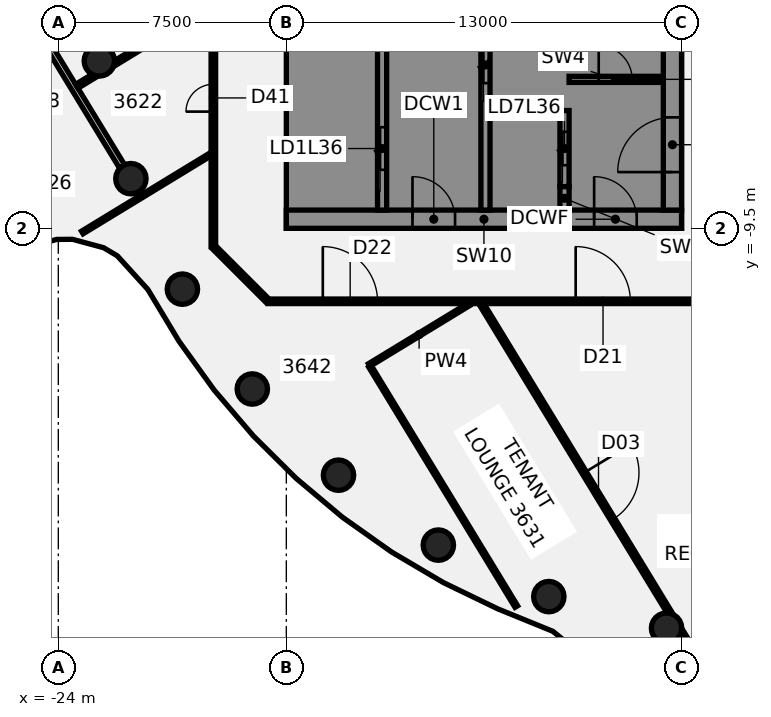
"""IFC4 building model, lengths in metres.
Left out: names, types, materials, properties, quantities, classifications, styles, units other than length and angle.
Written with IfcOpenShell. Run it as: python <this file> out.ifc"""

import sys

from ifc_helpers import new_model, si_unit, direction, frame, frame_2d, origin, origin_2d, place, context, subcontext, project, spatial, polyline, rectangle, circle, outline, extrude, element, fill, save


model = new_model("IFC4")
c1 = context("Model", 3, precision=1e-05, world=origin(), true_north=direction((0.0, 1.0)))
c2 = subcontext(c1, "Body", "Model", "MODEL_VIEW")
j1 = project(units=[si_unit("LENGTHUNIT", "METRE"), si_unit("PLANEANGLEUNIT", "RADIAN")], contexts=[c1])
p1 = place(None, origin())
s1 = spatial("IfcSite", under=j1, at=p1, CompositionType="ELEMENT")
p2 = place(p1, origin())
s2 = spatial("IfcBuilding", under=s1, at=p2, CompositionType="ELEMENT")
p3 = place(p2, frame((0.0, 0.0, 148.0)))
s3 = spatial("IfcBuildingStorey", under=s2, at=p3, CompositionType="ELEMENT", Elevation=148.0)
for number, where, z_axis, x_axis in (
    (1, (-22.651, -3.994, -0.14), (0.0, 0.0, 1.0), (1.0, 0.0, 0.0)),
    (2, (-21.613, -7.866, -0.14), (0.0, 0.0, 1.0), (1.0, 0.0, 0.0)),
    (3, (-19.919, -11.5, -0.14), (0.0, 0.0, 1.0), (1.0, 0.0, 0.0)),
    (4, (-17.619, -14.784, -0.14), (0.0, 0.0, 1.0), (1.0, 0.0, 0.0)),
    (5, (-14.784, -17.619, -0.14), (0.0, 0.0, 1.0), (1.0, 0.0, 0.0)),
    (6, (-11.5, -19.919, -0.14), (0.0, 0.0, 1.0), (1.0, 0.0, 0.0)),
    (7, (-7.866, -21.613, -0.14), (0.0, 0.0, 1.0), (1.0, 0.0, 0.0)),
    (8, (-3.994, -22.651, -0.14), (0.0, 0.0, 1.0), (1.0, 0.0, 0.0)),
):
    element("IfcColumn", number, at=place(p3, frame(where, z_axis=z_axis, x_axis=x_axis)), inside=s3, PredefinedType="COLUMN", context=c2, shape_type="SweptSolid", body=[
        extrude(circle(Radius=0.5, at=origin_2d()), origin(), (0.0, 0.0, 1.0), 3.75),
    ])
p4 = place(p3, frame((-28.73, 3.745, 0.0), z_axis=(0.0, 0.0, 1.0), x_axis=(0.520124017565, -0.854090748312, 0.0)))
e9 = element("IfcWall", 9, at=p4, inside=s3, PredefinedType="PARTITIONING", context=c2, shape_type="SweptSolid", body=[
    extrude(rectangle(XDim=13.121, YDim=0.2, at=frame_2d((6.561, 0.0))), origin(), (0.0, 0.0, 1.0), 3.01),
])
p5 = place(p4, frame((5.799, 0.0, 0.0)))
e10 = element("IfcOpeningElement", 10, at=p5, cuts=e9, PredefinedType="OPENING", context=c2, shape_type="SweptSolid", body=[
    extrude(rectangle(XDim=1.4, YDim=2.1, at=frame_2d((0.7, 1.05))), frame((0.0, 0.11, 0.0), z_axis=(0.0, -1.0, 0.0), x_axis=(1.0, 0.0, 0.0)), (0.0, 0.0, 1.0), 0.22),
])
p6 = place(p3, frame((-13.747, -14.039, 0.0), z_axis=(0.0, 0.0, 1.0), x_axis=(0.520158758084, -0.854069591069, 0.0)))
e11 = element("IfcWall", 11, at=p6, inside=s3, PredefinedType="PARTITIONING", context=c2, shape_type="SweptSolid", body=[
    extrude(rectangle(XDim=9.25, YDim=0.1, at=frame_2d((4.625, 0.0))), origin(), (0.0, 0.0, 1.0), 3.01),
])
p7 = place(p3, frame((-10.073, -11.998, 0.0), z_axis=(0.0, 0.0, 1.0), x_axis=(0.520207638853, -0.854039819024, 0.0)))
e12 = element("IfcWall", 12, at=p7, inside=s3, PredefinedType="PARTITIONING", context=c2, shape_type="SweptSolid", body=[
    extrude(rectangle(XDim=11.913, YDim=0.15, at=frame_2d((5.956, 0.0))), origin(), (0.0, 0.0, 1.0), 3.01),
])
p8 = place(p7, frame((6.485, 0.0, 0.0)))
e13 = element("IfcOpeningElement", 13, at=p8, cuts=e12, PredefinedType="OPENING", context=c2, shape_type="SweptSolid", body=[
    extrude(rectangle(XDim=1.8, YDim=2.1, at=frame_2d((0.9, 1.05))), frame((0.0, 0.085, 0.0), z_axis=(0.0, -1.0, 0.0), x_axis=(1.0, 0.0, 0.0)), (0.0, 0.0, 1.0), 0.17),
])
p9 = place(p3, frame((-3.515, -22.766, 0.0), z_axis=(0.0, 0.0, 1.0), x_axis=(0.520185263298, -0.854053447887, 0.0)))
e14 = element("IfcWall", 14, at=p9, inside=s3, PredefinedType="PARTITIONING", context=c2, shape_type="SweptSolid", body=[
    extrude(rectangle(XDim=4.875, YDim=0.15, at=frame_2d((2.437, 0.0))), origin(), (0.0, 0.0, 1.0), 3.01),
])
p10 = place(p3, frame((-18.872, -10.128, 0.0), z_axis=(0.0, 0.0, 1.0), x_axis=(0.707106781187, -0.707106781187, 0.0)))
e15 = element("IfcWall", 15, at=p10, inside=s3, PredefinedType="PARTITIONING", context=c2, shape_type="SweptSolid", body=[
    extrude(rectangle(XDim=2.465, YDim=0.15, at=frame_2d((1.232, 0.0))), origin(), (0.0, 0.0, 1.0), 3.01),
])
p11 = place(p3, frame((-17.1, -11.9, 0.0), z_axis=(0.0, 0.0, 1.0), x_axis=(1.0, 0.0, 0.0)))
e16 = element("IfcWall", 16, at=p11, inside=s3, PredefinedType="PARTITIONING", context=c2, shape_type="SweptSolid", body=[
    extrude(rectangle(XDim=34.165, YDim=0.15, at=frame_2d((17.083, 0.0))), origin(), (0.0, 0.0, 1.0), 3.01),
])
p12 = place(p11, frame((10.117, 0.0, 0.0)))
e17 = element("IfcOpeningElement", 17, at=p12, cuts=e16, PredefinedType="OPENING", context=c2, shape_type="SweptSolid", body=[
    extrude(rectangle(XDim=1.8, YDim=2.1, at=frame_2d((0.9, 1.05))), frame((0.0, 0.085, 0.0), z_axis=(0.0, -1.0, 0.0), x_axis=(1.0, 0.0, 0.0)), (0.0, 0.0, 1.0), 0.17),
])
p13 = place(p11, frame((1.8, 0.0, 0.0)))
e18 = element("IfcOpeningElement", 18, at=p13, cuts=e16, PredefinedType="OPENING", context=c2, shape_type="SweptSolid", body=[
    extrude(rectangle(XDim=1.8, YDim=2.1, at=frame_2d((0.9, 1.05))), frame((0.0, 0.085, 0.0), z_axis=(0.0, -1.0, 0.0), x_axis=(1.0, 0.0, 0.0)), (0.0, 0.0, 1.0), 0.17),
])
p14 = place(p11, frame((25.997, 0.0, 0.0)))
e19 = element("IfcOpeningElement", 19, at=p14, cuts=e16, PredefinedType="OPENING", context=c2, shape_type="SweptSolid", body=[
    extrude(rectangle(XDim=1.8, YDim=2.1, at=frame_2d((0.9, 1.05))), frame((0.0, 0.085, 0.0), z_axis=(0.0, -1.0, 0.0), x_axis=(1.0, 0.0, 0.0)), (0.0, 0.0, 1.0), 0.17),
])
p15 = place(p3, frame((-23.392, -4.828, 0.0), z_axis=(0.0, 0.0, 1.0), x_axis=(0.854171525625, 0.519991350708, 0.0)))
e20 = element("IfcWall", 20, at=p15, inside=s3, PredefinedType="PARTITIONING", context=c2, shape_type="SweptSolid", body=[
    extrude(rectangle(XDim=0.698, YDim=0.15, at=frame_2d((0.349, 0.0))), origin(), (0.0, 0.0, 1.0), 3.01),
])
p16 = place(p3, frame((-22.164, -4.08, 0.0), z_axis=(0.0, 0.0, 1.0), x_axis=(0.854120951194, 0.520074418454, 0.0)))
e21 = element("IfcWall", 21, at=p16, inside=s3, PredefinedType="PARTITIONING", context=c2, shape_type="SweptSolid", body=[
    extrude(rectangle(XDim=3.706, YDim=0.15, at=frame_2d((1.853, 0.0))), origin(), (0.0, 0.0, 1.0), 3.01),
])
p17 = place(p3, frame((-23.211, -9.636, 0.0), z_axis=(0.0, 0.0, 1.0), x_axis=(0.854072881225, 0.520153355806, 0.0)))
e22 = element("IfcWall", 22, at=p17, inside=s3, PredefinedType="PARTITIONING", context=c2, shape_type="SweptSolid", body=[
    extrude(rectangle(XDim=4.953, YDim=0.1, at=frame_2d((2.476, 0.0))), origin(), (0.0, 0.0, 1.0), 3.01),
])
p18 = place(p3, frame((-13.773, -13.996, 0.0), z_axis=(0.0, 0.0, 1.0), x_axis=(0.85407452776, 0.520150652245, 0.0)))
e23 = element("IfcWall", 23, at=p18, inside=s3, PredefinedType="PARTITIONING", context=c2, shape_type="SweptSolid", body=[
    extrude(rectangle(XDim=3.84, YDim=0.1, at=frame_2d((1.92, 0.0))), origin(), (0.0, 0.0, 1.0), 3.01),
])
p19 = place(p3, frame((-3.745, -28.73, 0.0), z_axis=(0.0, 0.0, 1.0), x_axis=(0.854090748312, 0.520124017565, 0.0)))
e24 = element("IfcWall", 24, at=p19, inside=s3, PredefinedType="PARTITIONING", context=c2, shape_type="SweptSolid", body=[
    extrude(rectangle(XDim=13.121, YDim=0.2, at=frame_2d((6.561, 0.0))), origin(), (0.0, 0.0, 1.0), 3.01),
])
p20 = place(p19, frame((6.099, 0.0, 0.0)))
e25 = element("IfcOpeningElement", 25, at=p20, cuts=e24, PredefinedType="OPENING", context=c2, shape_type="SweptSolid", body=[
    extrude(rectangle(XDim=1.4, YDim=2.1, at=frame_2d((0.7, 1.05))), frame((0.0, 0.11, 0.0), z_axis=(0.0, -1.0, 0.0), x_axis=(1.0, 0.0, 0.0)), (0.0, 0.0, 1.0), 0.22),
])
p21 = place(p3, frame((-18.9, -10.1, 0.0), z_axis=(0.0, 0.0, 1.0), x_axis=(0.0, 1.0, 0.0)))
e26 = element("IfcWall", 26, at=p21, inside=s3, PredefinedType="PARTITIONING", context=c2, shape_type="SweptSolid", body=[
    extrude(rectangle(XDim=20.2, YDim=0.15, at=frame_2d((10.1, 0.0))), origin(), (0.0, 0.0, 1.0), 3.01),
])
p22 = place(p21, frame((12.057, 0.0, 0.0)))
e27 = element("IfcOpeningElement", 27, at=p22, cuts=e26, PredefinedType="OPENING", context=c2, shape_type="SweptSolid", body=[
    extrude(rectangle(XDim=1.8, YDim=2.1, at=frame_2d((0.9, 1.05))), frame((0.0, 0.085, 0.0), z_axis=(0.0, -1.0, 0.0), x_axis=(1.0, 0.0, 0.0)), (0.0, 0.0, 1.0), 0.17),
])
p23 = place(p21, frame((4.439, 0.0, 0.0)))
e28 = element("IfcOpeningElement", 28, at=p23, cuts=e26, PredefinedType="OPENING", context=c2, shape_type="SweptSolid", body=[
    extrude(rectangle(XDim=0.9, YDim=2.1, at=frame_2d((0.45, 1.05))), frame((0.0, 0.085, 0.0), z_axis=(0.0, -1.0, 0.0), x_axis=(1.0, 0.0, 0.0)), (0.0, 0.0, 1.0), 0.17),
])
p24 = place(p3, frame((-16.5, -9.2, 0.0), z_axis=(0.0, 0.0, 1.0), x_axis=(1.0, 0.0, 0.0)))
e29 = element("IfcWall", 29, at=p24, inside=s3, PredefinedType="SHEAR", context=c2, shape_type="SweptSolid", body=[
    extrude(rectangle(XDim=13.0, YDim=0.6, at=frame_2d((6.5, 0.0))), origin(), (0.0, 0.0, 1.0), 3.61),
])
p25 = place(p24, frame((4.15, 0.0, 0.0)))
e30 = element("IfcOpeningElement", 30, at=p25, cuts=e29, PredefinedType="OPENING", context=c2, shape_type="SweptSolid", body=[
    extrude(rectangle(XDim=1.4, YDim=2.1, at=frame_2d((0.7, 1.05))), frame((0.0, 0.31, 0.0), z_axis=(0.0, -1.0, 0.0), x_axis=(1.0, 0.0, 0.0)), (0.0, 0.0, 1.0), 0.62),
])
p26 = place(p24, frame((10.125, 0.0, 0.0)))
e31 = element("IfcOpeningElement", 31, at=p26, cuts=e29, PredefinedType="OPENING", context=c2, shape_type="SweptSolid", body=[
    extrude(rectangle(XDim=1.4, YDim=2.1, at=frame_2d((0.7, 1.05))), frame((0.0, 0.31, 0.0), z_axis=(0.0, -1.0, 0.0), x_axis=(1.0, 0.0, 0.0)), (0.0, 0.0, 1.0), 0.62),
])
p27 = place(p3, origin())
e32 = element("IfcWall", 32, at=p27, inside=s3, PredefinedType="SHEAR", context=c2, shape_type="SweptSolid", body=[
    extrude(outline(polyline([(-13.5, -8.125), (-15.9, -8.125), (-15.9, -5.625), (-13.5, -5.625), (-13.5, -5.375), (-15.9, -5.375), (-15.9, 5.375), (-13.5, 5.375), (-13.5, 5.625), (-15.9, 5.625), (-15.9, 8.125), (-13.5, 8.125), (-13.5, 8.9), (-15.9, 8.9), (-16.5, 8.9), (-16.5, -8.9), (-15.9, -8.9), (-13.5, -8.9), (-13.5, -8.125)])), origin(), (0.0, 0.0, 1.0), 3.61),
])
p28 = place(p3, origin())
e33 = element("IfcWall", 33, at=p28, inside=s3, PredefinedType="SHEAR", context=c2, shape_type="SweptSolid", body=[
    extrude(outline(polyline([(-9.8, -5.375), (-9.8, -5.625), (-7.5, -5.625), (-7.2, -5.625), (-7.2, 8.9), (-7.5, 8.9), (-9.8, 8.9), (-9.8, 8.125), (-7.5, 8.125), (-7.5, 5.625), (-9.8, 5.625), (-9.8, 5.375), (-7.5, 5.375), (-7.5, 2.875), (-9.8, 2.875), (-9.8, 2.625), (-7.5, 2.625), (-7.5, 0.125), (-9.8, 0.125), (-9.8, -0.125), (-7.5, -0.125), (-7.5, -2.625), (-9.8, -2.625), (-9.8, -2.875), (-7.5, -2.875), (-7.5, -5.375), (-9.8, -5.375)])), origin(), (0.0, 0.0, 1.0), 3.61),
])
p29 = place(p3, origin())
e34 = element("IfcWall", 34, at=p29, inside=s3, PredefinedType="SHEAR", context=c2, shape_type="SweptSolid", body=[
    extrude(outline(polyline([(-7.5, -8.125), (-9.55, -8.125), (-9.55, -5.625), (-9.8, -5.625), (-9.8, -8.125), (-9.8, -8.9), (-7.5, -8.9), (-7.5, -8.125)])), origin(), (0.0, 0.0, 1.0), 3.61),
])
p30 = place(p3, frame((-7.35, -8.9, 0.0), z_axis=(0.0, 0.0, 1.0), x_axis=(0.0, 1.0, 0.0)))
e35 = element("IfcWall", 35, at=p30, inside=s3, PredefinedType="SHEAR", context=c2, shape_type="SweptSolid", body=[
    extrude(rectangle(XDim=0.775, YDim=0.3, at=frame_2d((0.387, 0.0))), origin(), (0.0, 0.0, 1.0), 3.61),
])
p31 = place(p3, frame((-13.35, -8.9, 0.0), z_axis=(0.0, 0.0, 1.0), x_axis=(0.0, 1.0, 0.0)))
e36 = element("IfcWall", 36, at=p31, inside=s3, PredefinedType="SHEAR", context=c2, shape_type="SweptSolid", body=[
    extrude(rectangle(XDim=17.8, YDim=0.3, at=frame_2d((8.9, 0.0))), origin(), (0.0, 0.0, 1.0), 3.61),
])
p32 = place(p31, frame((1.325, 0.0, 0.0)))
e37 = element("IfcOpeningElement", 37, at=p32, cuts=e36, PredefinedType="OPENING", context=c2, shape_type="SweptSolid", body=[
    extrude(rectangle(XDim=1.4, YDim=2.1, at=frame_2d((0.7, 1.05))), frame((0.0, 0.16, 0.0), z_axis=(0.0, -1.0, 0.0), x_axis=(1.0, 0.0, 0.0)), (0.0, 0.0, 1.0), 0.32),
])
p33 = place(p31, frame((6.546, 0.0, 0.0)))
e38 = element("IfcOpeningElement", 38, at=p33, cuts=e36, PredefinedType="OPENING", context=c2, shape_type="SweptSolid", body=[
    extrude(rectangle(XDim=1.0, YDim=2.1, at=frame_2d((0.5, 1.05))), frame((0.0, 0.16, 0.0), z_axis=(0.0, -1.0, 0.0), x_axis=(1.0, 0.0, 0.0)), (0.0, 0.0, 1.0), 0.32),
])
p34 = place(p31, frame((12.046, 0.0, 0.0)))
e39 = element("IfcOpeningElement", 39, at=p34, cuts=e36, PredefinedType="OPENING", context=c2, shape_type="SweptSolid", body=[
    extrude(rectangle(XDim=1.0, YDim=2.1, at=frame_2d((0.5, 1.05))), frame((0.0, 0.16, 0.0), z_axis=(0.0, -1.0, 0.0), x_axis=(1.0, 0.0, 0.0)), (0.0, 0.0, 1.0), 0.32),
])
p35 = place(p3, frame((-9.95, -8.9, 0.0), z_axis=(0.0, 0.0, 1.0), x_axis=(0.0, 1.0, 0.0)))
e40 = element("IfcWall", 40, at=p35, inside=s3, PredefinedType="SHEAR", context=c2, shape_type="SweptSolid", body=[
    extrude(rectangle(XDim=17.8, YDim=0.3, at=frame_2d((8.9, 0.0))), origin(), (0.0, 0.0, 1.0), 3.61),
])
p36 = place(p35, frame((4.175, 0.0, 0.0)))
e41 = element("IfcOpeningElement", 41, at=p36, cuts=e40, PredefinedType="OPENING", context=c2, shape_type="SweptSolid", body=[
    extrude(rectangle(XDim=1.2, YDim=2.1, at=frame_2d((0.6, 1.05))), frame((0.0, 0.16, 0.0), z_axis=(0.0, -1.0, 0.0), x_axis=(1.0, 0.0, 0.0)), (0.0, 0.0, 1.0), 0.32),
])
p37 = place(p35, frame((6.925, 0.0, 0.0)))
e42 = element("IfcOpeningElement", 42, at=p37, cuts=e40, PredefinedType="OPENING", context=c2, shape_type="SweptSolid", body=[
    extrude(rectangle(XDim=1.2, YDim=2.1, at=frame_2d((0.6, 1.05))), frame((0.0, 0.16, 0.0), z_axis=(0.0, -1.0, 0.0), x_axis=(1.0, 0.0, 0.0)), (0.0, 0.0, 1.0), 0.32),
])
p38 = place(p3, frame((-7.35, -8.125, 0.0), z_axis=(0.0, 0.0, 1.0), x_axis=(0.0, 1.0, 0.0)))
e43 = element("IfcWall", 43, at=p38, inside=s3, PredefinedType="SHEAR", context=c2, shape_type="SweptSolid", body=[
    extrude(rectangle(XDim=2.5, YDim=0.3, at=frame_2d((1.25, 0.0))), origin(), (0.0, 0.0, 1.0), 3.61),
])
p39 = place(p38, frame((0.7, 0.0, 0.0)))
e44 = element("IfcOpeningElement", 44, at=p39, cuts=e43, PredefinedType="OPENING", context=c2, shape_type="SweptSolid", body=[
    extrude(rectangle(XDim=1.1, YDim=2.1, at=frame_2d((0.55, 1.05))), frame((0.0, 0.16, 0.0), z_axis=(0.0, -1.0, 0.0), x_axis=(1.0, 0.0, 0.0)), (0.0, 0.0, 1.0), 0.32),
])
p40 = place(p3, frame((-3.8, -8.9, 0.0), z_axis=(0.0, 0.0, 1.0), x_axis=(0.0, 1.0, 0.0)))
e45 = element("IfcWall", 45, at=p40, inside=s3, PredefinedType="SHEAR", context=c2, shape_type="SweptSolid", body=[
    extrude(rectangle(XDim=17.8, YDim=0.6, at=frame_2d((8.9, 0.0))), origin(), (0.0, 0.0, 1.0), 3.61),
])
p41 = place(p40, frame((1.25, 0.0, 0.0)))
e46 = element("IfcOpeningElement", 46, at=p41, cuts=e45, PredefinedType="OPENING", context=c2, shape_type="SweptSolid", body=[
    extrude(rectangle(XDim=1.8, YDim=2.1, at=frame_2d((0.9, 1.05))), frame((0.0, 0.31, 0.0), z_axis=(0.0, -1.0, 0.0), x_axis=(1.0, 0.0, 0.0)), (0.0, 0.0, 1.0), 0.62),
])
p42 = place(p40, frame((11.698, 0.0, 0.0)))
e47 = element("IfcOpeningElement", 47, at=p42, cuts=e45, PredefinedType="OPENING", context=c2, shape_type="SweptSolid", body=[
    extrude(rectangle(XDim=1.0, YDim=2.1, at=frame_2d((0.5, 1.05))), frame((0.0, 0.31, 0.0), z_axis=(0.0, -1.0, 0.0), x_axis=(1.0, 0.0, 0.0)), (0.0, 0.0, 1.0), 0.62),
])
p43 = place(p40, frame((15.222, 0.0, 0.0)))
e48 = element("IfcOpeningElement", 48, at=p43, cuts=e45, PredefinedType="OPENING", context=c2, shape_type="SweptSolid", body=[
    extrude(rectangle(XDim=1.0, YDim=2.1, at=frame_2d((0.5, 1.05))), frame((0.0, 0.31, 0.0), z_axis=(0.0, -1.0, 0.0), x_axis=(1.0, 0.0, 0.0)), (0.0, 0.0, 1.0), 0.62),
])
p44 = place(p3, frame((-7.2, -4.6, 0.0), z_axis=(0.0, 0.0, 1.0), x_axis=(1.0, 0.0, 0.0)))
e49 = element("IfcWall", 49, at=p44, inside=s3, PredefinedType="SHEAR", context=c2, shape_type="SweptSolid", body=[
    extrude(rectangle(XDim=3.1, YDim=0.2, at=frame_2d((1.55, 0.0))), origin(), (0.0, 0.0, 1.0), 3.61),
])
p45 = place(p44, frame((0.975, 0.0, 0.0)))
e50 = element("IfcOpeningElement", 50, at=p45, cuts=e49, PredefinedType="OPENING", context=c2, shape_type="SweptSolid", body=[
    extrude(rectangle(XDim=1.1, YDim=2.1, at=frame_2d((0.55, 1.05))), frame((0.0, 0.11, 0.0), z_axis=(0.0, -1.0, 0.0), x_axis=(1.0, 0.0, 0.0)), (0.0, 0.0, 1.0), 0.22),
])
p46 = place(p8, frame((1.8, 0.0, 0.0), z_axis=(0.0, 0.0, 1.0), x_axis=(-1.0, 0.0, 0.0)))
e51 = element("IfcDoor", 51, at=p46, inside=s3, OperationType="DOUBLE_DOOR_SINGLE_SWING", PredefinedType="DOOR", context=c2, shape_type="SweptSolid", body=[
    extrude(rectangle(XDim=1.8, YDim=2.1, at=frame_2d((0.9, 1.05))), frame((0.0, 0.025, 0.0), z_axis=(0.0, -1.0, 0.0), x_axis=(1.0, 0.0, 0.0)), (0.0, 0.0, 1.0), 0.05),
])
fill(e13, e51)
p47 = place(p12, origin())
e52 = element("IfcDoor", 52, at=p47, inside=s3, OperationType="DOUBLE_DOOR_SINGLE_SWING", PredefinedType="DOOR", context=c2, shape_type="SweptSolid", body=[
    extrude(rectangle(XDim=1.8, YDim=2.1, at=frame_2d((0.9, 1.05))), frame((0.0, 0.025, 0.0), z_axis=(0.0, -1.0, 0.0), x_axis=(1.0, 0.0, 0.0)), (0.0, 0.0, 1.0), 0.05),
])
fill(e17, e52)
p48 = place(p13, frame((1.8, 0.0, 0.0), z_axis=(0.0, 0.0, 1.0), x_axis=(-1.0, 0.0, 0.0)))
e53 = element("IfcDoor", 53, at=p48, inside=s3, OperationType="DOUBLE_DOOR_SINGLE_SWING", PredefinedType="DOOR", context=c2, shape_type="SweptSolid", body=[
    extrude(rectangle(XDim=1.8, YDim=2.1, at=frame_2d((0.9, 1.05))), frame((0.0, 0.025, 0.0), z_axis=(0.0, -1.0, 0.0), x_axis=(1.0, 0.0, 0.0)), (0.0, 0.0, 1.0), 0.05),
])
fill(e18, e53)
p49 = place(p23, origin())
e54 = element("IfcDoor", 54, at=p49, inside=s3, OperationType="SINGLE_SWING_RIGHT", PredefinedType="DOOR", context=c2, shape_type="SweptSolid", body=[
    extrude(rectangle(XDim=0.9, YDim=2.1, at=frame_2d((0.45, 1.05))), frame((0.0, 0.025, 0.0), z_axis=(0.0, -1.0, 0.0), x_axis=(1.0, 0.0, 0.0)), (0.0, 0.0, 1.0), 0.05),
])
fill(e28, e54)
p50 = place(p25, origin())
e55 = element("IfcDoor", 55, at=p50, inside=s3, OperationType="SINGLE_SWING_LEFT", PredefinedType="DOOR", context=c2, shape_type="SweptSolid", body=[
    extrude(rectangle(XDim=1.4, YDim=2.1, at=frame_2d((0.7, 1.05))), frame((0.0, 0.025, 0.0), z_axis=(0.0, -1.0, 0.0), x_axis=(1.0, 0.0, 0.0)), (0.0, 0.0, 1.0), 0.05),
])
fill(e30, e55)
p51 = place(p26, origin())
e56 = element("IfcDoor", 56, at=p51, inside=s3, OperationType="SINGLE_SWING_LEFT", PredefinedType="DOOR", context=c2, shape_type="SweptSolid", body=[
    extrude(rectangle(XDim=1.4, YDim=2.1, at=frame_2d((0.7, 1.05))), frame((0.0, 0.025, 0.0), z_axis=(0.0, -1.0, 0.0), x_axis=(1.0, 0.0, 0.0)), (0.0, 0.0, 1.0), 0.05),
])
fill(e31, e56)
p52 = place(p41, origin())
e57 = element("IfcDoor", 57, at=p52, inside=s3, OperationType="SINGLE_SWING_LEFT", PredefinedType="DOOR", context=c2, shape_type="SweptSolid", body=[
    extrude(rectangle(XDim=1.8, YDim=2.1, at=frame_2d((0.9, 1.05))), frame((0.0, 0.025, 0.0), z_axis=(0.0, -1.0, 0.0), x_axis=(1.0, 0.0, 0.0)), (0.0, 0.0, 1.0), 0.05),
])
fill(e46, e57)
p53 = place(p45, origin())
e58 = element("IfcDoor", 58, at=p53, inside=s3, OperationType="SINGLE_SWING_LEFT", PredefinedType="DOOR", context=c2, shape_type="SweptSolid", body=[
    extrude(rectangle(XDim=1.1, YDim=2.1, at=frame_2d((0.55, 1.05))), frame((0.0, 0.025, 0.0), z_axis=(0.0, -1.0, 0.0), x_axis=(1.0, 0.0, 0.0)), (0.0, 0.0, 1.0), 0.05),
])
fill(e50, e58)
p54 = place(p32, origin())
e59 = element("IfcDoor", 59, at=p54, inside=s3, OperationType="SLIDING_TO_LEFT", PredefinedType="DOOR", context=c2, shape_type="SweptSolid", body=[
    extrude(rectangle(XDim=1.4, YDim=2.1, at=frame_2d((0.7, 1.05))), frame((0.0, 0.025, 0.0), z_axis=(0.0, -1.0, 0.0), x_axis=(1.0, 0.0, 0.0)), (0.0, 0.0, 1.0), 0.05),
])
fill(e37, e59)
p55 = place(p39, origin())
e60 = element("IfcDoor", 60, at=p55, inside=s3, OperationType="SLIDING_TO_LEFT", PredefinedType="DOOR", context=c2, shape_type="SweptSolid", body=[
    extrude(rectangle(XDim=1.1, YDim=2.1, at=frame_2d((0.55, 1.05))), frame((0.0, 0.025, 0.0), z_axis=(0.0, -1.0, 0.0), x_axis=(1.0, 0.0, 0.0)), (0.0, 0.0, 1.0), 0.05),
])
fill(e44, e60)
p56 = place(p36, origin())
e61 = element("IfcDoor", 61, at=p56, inside=s3, OperationType="SLIDING_TO_LEFT", PredefinedType="DOOR", context=c2, shape_type="SweptSolid", body=[
    extrude(rectangle(XDim=1.2, YDim=2.1, at=frame_2d((0.6, 1.05))), frame((0.0, 0.025, 0.0), z_axis=(0.0, -1.0, 0.0), x_axis=(1.0, 0.0, 0.0)), (0.0, 0.0, 1.0), 0.05),
])
fill(e41, e61)
save(model, sys.argv[1])
